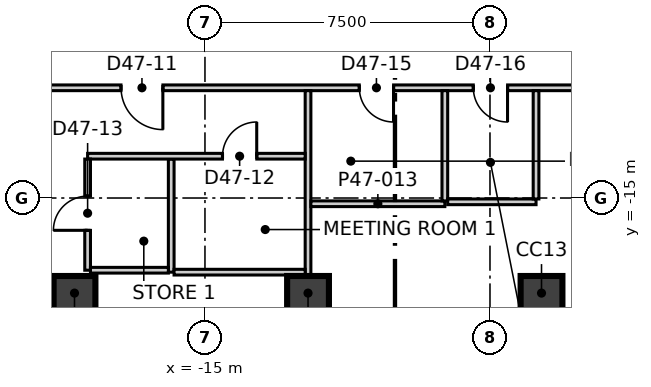
"""IFC4 building model, lengths in metres.
Left out: names, types, materials, properties, quantities, classifications, styles, units other than length and angle.
Written with IfcOpenShell. Run it as: python <this file> out.ifc"""

import sys

from ifc_helpers import new_model, si_unit, direction, frame, frame_2d, origin, origin_2d, place, context, subcontext, project, spatial, rectangle, extrude, element, fill, save


model = new_model("IFC4")
c1 = context("Model", 3, precision=1e-05, world=origin(), true_north=direction((0.0, 1.0)))
c2 = subcontext(c1, "Body", "Model", "MODEL_VIEW")
j1 = project(units=[si_unit("LENGTHUNIT", "METRE"), si_unit("PLANEANGLEUNIT", "RADIAN")], contexts=[c1])
p1 = place(None, origin())
s1 = spatial("IfcSite", under=j1, at=p1, CompositionType="ELEMENT")
p2 = place(p1, origin())
s2 = spatial("IfcBuilding", under=s1, at=p2, CompositionType="ELEMENT")
p3 = place(p2, frame((0.0, 0.0, 203.3)))
s3 = spatial("IfcBuildingStorey", under=s2, at=p3, CompositionType="ELEMENT", Elevation=203.3)
for number, where, z_axis, x_axis in (
    (1, (-18.433, -17.502, -0.3), (0.0, 0.0, 1.0), (1.0, 0.0, 0.0)),
    (2, (-12.288, -17.502, -0.3), (0.0, 0.0, 1.0), (1.0, 0.0, 0.0)),
    (3, (-6.144, -17.502, -0.3), (0.0, 0.0, 1.0), (1.0, 0.0, 0.0)),
):
    element("IfcColumn", number, at=place(p3, frame(where, z_axis=z_axis, x_axis=x_axis)), inside=s3, PredefinedType="COLUMN", context=c2, shape_type="SweptSolid", body=[
        extrude(rectangle(XDim=1.1, YDim=0.9, at=origin_2d()), origin(), (0.0, 0.0, 1.0), 4.0),
    ])
p4 = place(p3, frame((-2.824, 31.513, 0.0), z_axis=(0.0, 0.0, 1.0), x_axis=(-0.500012324412, -0.866018288165, 0.0)))
e4 = element("IfcWall", 4, at=p4, inside=s3, PredefinedType="ELEMENTEDWALL", context=c2, shape_type="SweptSolid", body=[
    extrude(rectangle(XDim=51.739, YDim=0.2, at=frame_2d((25.87, 0.0))), origin(), (0.0, 0.0, 1.0), 3.7),
])
p5 = place(p4, frame((2.275, 0.0, 0.9)))
e5 = element("IfcOpeningElement", 5, at=p5, cuts=e4, PredefinedType="OPENING", context=c2, shape_type="SweptSolid", body=[
    extrude(rectangle(XDim=4.2, YDim=2.5, at=frame_2d((2.1, 1.25))), frame((0.0, 0.11, 0.0), z_axis=(0.0, -1.0, 0.0), x_axis=(1.0, 0.0, 0.0)), (0.0, 0.0, 1.0), 0.22),
])
p6 = place(p4, frame((8.419, 0.0, 0.9)))
e6 = element("IfcOpeningElement", 6, at=p6, cuts=e4, PredefinedType="OPENING", context=c2, shape_type="SweptSolid", body=[
    extrude(rectangle(XDim=4.2, YDim=2.5, at=frame_2d((2.1, 1.25))), frame((0.0, 0.11, 0.0), z_axis=(0.0, -1.0, 0.0), x_axis=(1.0, 0.0, 0.0)), (0.0, 0.0, 1.0), 0.22),
])
p7 = place(p4, frame((14.563, 0.0, 0.9)))
e7 = element("IfcOpeningElement", 7, at=p7, cuts=e4, PredefinedType="OPENING", context=c2, shape_type="SweptSolid", body=[
    extrude(rectangle(XDim=4.2, YDim=2.5, at=frame_2d((2.1, 1.25))), frame((0.0, 0.11, 0.0), z_axis=(0.0, -1.0, 0.0), x_axis=(1.0, 0.0, 0.0)), (0.0, 0.0, 1.0), 0.22),
])
p8 = place(p4, frame((20.707, 0.0, 0.9)))
e8 = element("IfcOpeningElement", 8, at=p8, cuts=e4, PredefinedType="OPENING", context=c2, shape_type="SweptSolid", body=[
    extrude(rectangle(XDim=4.2, YDim=2.5, at=frame_2d((2.1, 1.25))), frame((0.0, 0.11, 0.0), z_axis=(0.0, -1.0, 0.0), x_axis=(1.0, 0.0, 0.0)), (0.0, 0.0, 1.0), 0.22),
])
p9 = place(p4, frame((26.851, 0.0, 0.9)))
e9 = element("IfcOpeningElement", 9, at=p9, cuts=e4, PredefinedType="OPENING", context=c2, shape_type="SweptSolid", body=[
    extrude(rectangle(XDim=4.2, YDim=2.5, at=frame_2d((2.1, 1.25))), frame((0.0, 0.11, 0.0), z_axis=(0.0, -1.0, 0.0), x_axis=(1.0, 0.0, 0.0)), (0.0, 0.0, 1.0), 0.22),
])
p10 = place(p4, frame((32.995, 0.0, 0.9)))
e10 = element("IfcOpeningElement", 10, at=p10, cuts=e4, PredefinedType="OPENING", context=c2, shape_type="SweptSolid", body=[
    extrude(rectangle(XDim=4.2, YDim=2.5, at=frame_2d((2.1, 1.25))), frame((0.0, 0.11, 0.0), z_axis=(0.0, -1.0, 0.0), x_axis=(1.0, 0.0, 0.0)), (0.0, 0.0, 1.0), 0.22),
])
p11 = place(p4, frame((39.14, 0.0, 0.9)))
e11 = element("IfcOpeningElement", 11, at=p11, cuts=e4, PredefinedType="OPENING", context=c2, shape_type="SweptSolid", body=[
    extrude(rectangle(XDim=4.2, YDim=2.5, at=frame_2d((2.1, 1.25))), frame((0.0, 0.11, 0.0), z_axis=(0.0, -1.0, 0.0), x_axis=(1.0, 0.0, 0.0)), (0.0, 0.0, 1.0), 0.22),
])
p12 = place(p4, frame((45.284, 0.0, 0.9)))
e12 = element("IfcOpeningElement", 12, at=p12, cuts=e4, PredefinedType="OPENING", context=c2, shape_type="SweptSolid", body=[
    extrude(rectangle(XDim=4.2, YDim=2.5, at=frame_2d((2.1, 1.25))), frame((0.0, 0.11, 0.0), z_axis=(0.0, -1.0, 0.0), x_axis=(1.0, 0.0, 0.0)), (0.0, 0.0, 1.0), 0.22),
])
p13 = place(p3, frame((-20.883, -11.97, 0.0), z_axis=(0.0, 0.0, 1.0), x_axis=(0.500006150555, 0.866021852731, 0.0)))
e13 = element("IfcWall", 13, at=p13, inside=s3, PredefinedType="PARTITIONING", context=c2, shape_type="SweptSolid", body=[
    extrude(rectangle(XDim=41.766, YDim=0.15, at=frame_2d((20.883, 0.0))), origin(), (0.0, 0.0, 1.0), 3.7),
])
p14 = place(p13, frame((36.916, 0.0, 0.0)))
e14 = element("IfcOpeningElement", 14, at=p14, cuts=e13, PredefinedType="OPENING", context=c2, shape_type="SweptSolid", body=[
    extrude(rectangle(XDim=1.1, YDim=2.1, at=frame_2d((0.55, 1.05))), frame((0.0, 0.085, 0.0), z_axis=(0.0, -1.0, 0.0), x_axis=(1.0, 0.0, 0.0)), (0.0, 0.0, 1.0), 0.17),
])
p15 = place(p13, frame((26.446, 0.0, 0.0)))
e15 = element("IfcOpeningElement", 15, at=p15, cuts=e13, PredefinedType="OPENING", context=c2, shape_type="SweptSolid", body=[
    extrude(rectangle(XDim=1.1, YDim=2.1, at=frame_2d((0.55, 1.05))), frame((0.0, 0.085, 0.0), z_axis=(0.0, -1.0, 0.0), x_axis=(1.0, 0.0, 0.0)), (0.0, 0.0, 1.0), 0.17),
])
p16 = place(p13, frame((9.757, 0.0, 0.0)))
e16 = element("IfcOpeningElement", 16, at=p16, cuts=e13, PredefinedType="OPENING", context=c2, shape_type="SweptSolid", body=[
    extrude(rectangle(XDim=1.1, YDim=2.1, at=frame_2d((0.55, 1.05))), frame((0.0, 0.085, 0.0), z_axis=(0.0, -1.0, 0.0), x_axis=(1.0, 0.0, 0.0)), (0.0, 0.0, 1.0), 0.17),
])
p17 = place(p13, frame((18.757, 0.0, 0.0)))
e17 = element("IfcOpeningElement", 17, at=p17, cuts=e13, PredefinedType="OPENING", context=c2, shape_type="SweptSolid", body=[
    extrude(rectangle(XDim=0.9, YDim=2.1, at=frame_2d((0.45, 1.05))), frame((0.0, 0.085, 0.0), z_axis=(0.0, -1.0, 0.0), x_axis=(1.0, 0.0, 0.0)), (0.0, 0.0, 1.0), 0.17),
])
p18 = place(p13, frame((15.557, 0.0, 0.0)))
e18 = element("IfcOpeningElement", 18, at=p18, cuts=e13, PredefinedType="OPENING", context=c2, shape_type="SweptSolid", body=[
    extrude(rectangle(XDim=0.9, YDim=2.1, at=frame_2d((0.45, 1.05))), frame((0.0, 0.085, 0.0), z_axis=(0.0, -1.0, 0.0), x_axis=(1.0, 0.0, 0.0)), (0.0, 0.0, 1.0), 0.17),
])
p19 = place(p13, frame((12.657, 0.0, 0.0)))
e19 = element("IfcOpeningElement", 19, at=p19, cuts=e13, PredefinedType="OPENING", context=c2, shape_type="SweptSolid", body=[
    extrude(rectangle(XDim=1.0, YDim=2.1, at=frame_2d((0.5, 1.05))), frame((0.0, 0.085, 0.0), z_axis=(0.0, -1.0, 0.0), x_axis=(1.0, 0.0, 0.0)), (0.0, 0.0, 1.0), 0.17),
])
p20 = place(p13, frame((3.669, 0.0, 0.0)))
e20 = element("IfcOpeningElement", 20, at=p20, cuts=e13, PredefinedType="OPENING", context=c2, shape_type="SweptSolid", body=[
    extrude(rectangle(XDim=1.1, YDim=2.1, at=frame_2d((0.55, 1.05))), frame((0.0, 0.085, 0.0), z_axis=(0.0, -1.0, 0.0), x_axis=(1.0, 0.0, 0.0)), (0.0, 0.0, 1.0), 0.17),
])
p21 = place(p3, frame((-20.808, -12.1, 0.0), z_axis=(0.0, 0.0, 1.0), x_axis=(1.0, 0.0, 0.0)))
e21 = element("IfcWall", 21, at=p21, inside=s3, PredefinedType="PARTITIONING", context=c2, shape_type="SweptSolid", body=[
    extrude(rectangle(XDim=41.766, YDim=0.15, at=frame_2d((20.883, 0.0))), origin(), (0.0, 0.0, 1.0), 3.7),
])
p22 = place(p21, frame((3.6, 0.0, 0.0)))
e22 = element("IfcOpeningElement", 22, at=p22, cuts=e21, PredefinedType="OPENING", context=c2, shape_type="SweptSolid", body=[
    extrude(rectangle(XDim=1.1, YDim=2.1, at=frame_2d((0.55, 1.05))), frame((0.0, 0.085, 0.0), z_axis=(0.0, -1.0, 0.0), x_axis=(1.0, 0.0, 0.0)), (0.0, 0.0, 1.0), 0.17),
])
p23 = place(p21, frame((17.07, 0.0, 0.0)))
e23 = element("IfcOpeningElement", 23, at=p23, cuts=e21, PredefinedType="OPENING", context=c2, shape_type="SweptSolid", body=[
    extrude(rectangle(XDim=1.1, YDim=2.1, at=frame_2d((0.55, 1.05))), frame((0.0, 0.085, 0.0), z_axis=(0.0, -1.0, 0.0), x_axis=(1.0, 0.0, 0.0)), (0.0, 0.0, 1.0), 0.17),
])
p24 = place(p21, frame((9.87, 0.0, 0.0)))
e24 = element("IfcOpeningElement", 24, at=p24, cuts=e21, PredefinedType="OPENING", context=c2, shape_type="SweptSolid", body=[
    extrude(rectangle(XDim=0.9, YDim=2.1, at=frame_2d((0.45, 1.05))), frame((0.0, 0.085, 0.0), z_axis=(0.0, -1.0, 0.0), x_axis=(1.0, 0.0, 0.0)), (0.0, 0.0, 1.0), 0.17),
])
p25 = place(p21, frame((12.87, 0.0, 0.0)))
e25 = element("IfcOpeningElement", 25, at=p25, cuts=e21, PredefinedType="OPENING", context=c2, shape_type="SweptSolid", body=[
    extrude(rectangle(XDim=0.9, YDim=2.1, at=frame_2d((0.45, 1.05))), frame((0.0, 0.085, 0.0), z_axis=(0.0, -1.0, 0.0), x_axis=(1.0, 0.0, 0.0)), (0.0, 0.0, 1.0), 0.17),
])
p26 = place(p21, frame((27.658, 0.0, 0.0)))
e26 = element("IfcOpeningElement", 26, at=p26, cuts=e21, PredefinedType="OPENING", context=c2, shape_type="SweptSolid", body=[
    extrude(rectangle(XDim=1.0, YDim=2.1, at=frame_2d((0.5, 1.05))), frame((0.0, 0.085, 0.0), z_axis=(0.0, -1.0, 0.0), x_axis=(1.0, 0.0, 0.0)), (0.0, 0.0, 1.0), 0.17),
])
p27 = place(p21, frame((21.558, 0.0, 0.0)))
e27 = element("IfcOpeningElement", 27, at=p27, cuts=e21, PredefinedType="OPENING", context=c2, shape_type="SweptSolid", body=[
    extrude(rectangle(XDim=0.9, YDim=2.1, at=frame_2d((0.45, 1.05))), frame((0.0, 0.085, 0.0), z_axis=(0.0, -1.0, 0.0), x_axis=(1.0, 0.0, 0.0)), (0.0, 0.0, 1.0), 0.17),
])
p28 = place(p21, frame((36.847, 0.0, 0.0)))
e28 = element("IfcOpeningElement", 28, at=p28, cuts=e21, PredefinedType="OPENING", context=c2, shape_type="SweptSolid", body=[
    extrude(rectangle(XDim=1.1, YDim=2.1, at=frame_2d((0.55, 1.05))), frame((0.0, 0.085, 0.0), z_axis=(0.0, -1.0, 0.0), x_axis=(1.0, 0.0, 0.0)), (0.0, 0.0, 1.0), 0.17),
])
p29 = place(p3, frame((-12.288, -18.122, 0.0), z_axis=(0.0, 0.0, 1.0), x_axis=(0.0, 1.0, 0.0)))
e29 = element("IfcWall", 29, at=p29, inside=s3, PredefinedType="PARTITIONING", context=c2, shape_type="SweptSolid", body=[
    extrude(rectangle(XDim=5.947, YDim=0.15, at=frame_2d((2.974, 0.0))), origin(), (0.0, 0.0, 1.0), 3.7),
])
p30 = place(p3, frame((-12.213, -15.151, 0.0), z_axis=(0.0, 0.0, 1.0), x_axis=(1.0, 0.0, 0.0)))
e30 = element("IfcWall", 30, at=p30, inside=s3, PredefinedType="PARTITIONING", context=c2, shape_type="SweptSolid", body=[
    extrude(rectangle(XDim=3.525, YDim=0.15, at=frame_2d((1.762, 0.0))), origin(), (0.0, 0.0, 1.0), 3.7),
])
p31 = place(p3, frame((-8.688, -15.076, 0.0), z_axis=(0.0, 0.0, 1.0), x_axis=(0.0, 1.0, 0.0)))
e31 = element("IfcWall", 31, at=p31, inside=s3, PredefinedType="PARTITIONING", context=c2, shape_type="SweptSolid", body=[
    extrude(rectangle(XDim=2.901, YDim=0.15, at=frame_2d((1.45, 0.0))), origin(), (0.0, 0.0, 1.0), 3.7),
])
p32 = place(p3, frame((-8.613, -15.1, 0.0), z_axis=(0.0, 0.0, 1.0), x_axis=(1.0, 0.0, 0.0)))
e32 = element("IfcWall", 32, at=p32, inside=s3, PredefinedType="PARTITIONING", context=c2, shape_type="SweptSolid", body=[
    extrude(rectangle(XDim=2.325, YDim=0.15, at=frame_2d((1.163, 0.0))), origin(), (0.0, 0.0, 1.0), 3.7),
])
p33 = place(p3, frame((-6.288, -15.025, 0.0), z_axis=(0.0, 0.0, 1.0), x_axis=(0.0, 1.0, 0.0)))
e33 = element("IfcWall", 33, at=p33, inside=s3, PredefinedType="PARTITIONING", context=c2, shape_type="SweptSolid", body=[
    extrude(rectangle(XDim=2.85, YDim=0.15, at=frame_2d((1.425, 0.0))), origin(), (0.0, 0.0, 1.0), 3.7),
])
p34 = place(p3, frame((-15.888, -16.951, 0.0), z_axis=(0.0, 0.0, 1.0), x_axis=(0.0, 1.0, 0.0)))
e34 = element("IfcWall", 34, at=p34, inside=s3, PredefinedType="PARTITIONING", context=c2, shape_type="SweptSolid", body=[
    extrude(rectangle(XDim=2.976, YDim=0.15, at=frame_2d((1.488, 0.0))), origin(), (0.0, 0.0, 1.0), 3.7),
])
p35 = place(p3, frame((-18.088, -13.9, 0.0), z_axis=(0.0, 0.0, 1.0), x_axis=(1.0, 0.0, 0.0)))
e35 = element("IfcWall", 35, at=p35, inside=s3, PredefinedType="PARTITIONING", context=c2, shape_type="SweptSolid", body=[
    extrude(rectangle(XDim=5.725, YDim=0.15, at=frame_2d((2.862, 0.0))), origin(), (0.0, 0.0, 1.0), 3.7),
])
p36 = place(p35, frame((3.55, 0.0, 0.0)))
e36 = element("IfcOpeningElement", 36, at=p36, cuts=e35, PredefinedType="OPENING", context=c2, shape_type="SweptSolid", body=[
    extrude(rectangle(XDim=0.9, YDim=2.1, at=frame_2d((0.45, 1.05))), frame((0.0, 0.085, 0.0), z_axis=(0.0, -1.0, 0.0), x_axis=(1.0, 0.0, 0.0)), (0.0, 0.0, 1.0), 0.17),
])
p37 = place(p3, frame((-18.088, -16.9, 0.0), z_axis=(0.0, 0.0, 1.0), x_axis=(0.0, 1.0, 0.0)))
e37 = element("IfcWall", 37, at=p37, inside=s3, PredefinedType="PARTITIONING", context=c2, shape_type="SweptSolid", body=[
    extrude(rectangle(XDim=2.925, YDim=0.15, at=frame_2d((1.462, 0.0))), origin(), (0.0, 0.0, 1.0), 3.7),
])
p38 = place(p37, frame((1.05, 0.0, 0.0)))
e38 = element("IfcOpeningElement", 38, at=p38, cuts=e37, PredefinedType="OPENING", context=c2, shape_type="SweptSolid", body=[
    extrude(rectangle(XDim=0.9, YDim=2.1, at=frame_2d((0.45, 1.05))), frame((0.0, 0.085, 0.0), z_axis=(0.0, -1.0, 0.0), x_axis=(1.0, 0.0, 0.0)), (0.0, 0.0, 1.0), 0.17),
])
p39 = place(p3, frame((-18.013, -16.9, 0.0), z_axis=(0.0, 0.0, 1.0), x_axis=(1.0, 0.0, 0.0)))
e39 = element("IfcWall", 39, at=p39, inside=s3, PredefinedType="PARTITIONING", context=c2, shape_type="SweptSolid", body=[
    extrude(rectangle(XDim=2.05, YDim=0.15, at=frame_2d((1.025, 0.0))), origin(), (0.0, 0.0, 1.0), 3.7),
])
p40 = place(p3, frame((-15.813, -16.951, 0.0), z_axis=(0.0, 0.0, 1.0), x_axis=(1.0, 0.0, 0.0)))
e40 = element("IfcWall", 40, at=p40, inside=s3, PredefinedType="PARTITIONING", context=c2, shape_type="SweptSolid", body=[
    extrude(rectangle(XDim=3.45, YDim=0.15, at=frame_2d((1.725, 0.0))), origin(), (0.0, 0.0, 1.0), 3.7),
])
p41 = place(p22, origin())
e41 = element("IfcDoor", 41, at=p41, inside=s3, OperationType="SINGLE_SWING_RIGHT", PredefinedType="DOOR", context=c2, shape_type="SweptSolid", body=[
    extrude(rectangle(XDim=1.1, YDim=2.1, at=frame_2d((0.55, 1.05))), frame((0.0, 0.025, 0.0), z_axis=(0.0, -1.0, 0.0), x_axis=(1.0, 0.0, 0.0)), (0.0, 0.0, 1.0), 0.05),
])
fill(e22, e41)
p42 = place(p36, origin())
e42 = element("IfcDoor", 42, at=p42, inside=s3, OperationType="SINGLE_SWING_LEFT", PredefinedType="DOOR", context=c2, shape_type="SweptSolid", body=[
    extrude(rectangle(XDim=0.9, YDim=2.1, at=frame_2d((0.45, 1.05))), frame((0.0, 0.025, 0.0), z_axis=(0.0, -1.0, 0.0), x_axis=(1.0, 0.0, 0.0)), (0.0, 0.0, 1.0), 0.05),
])
fill(e36, e42)
p43 = place(p38, origin())
e43 = element("IfcDoor", 43, at=p43, inside=s3, OperationType="SINGLE_SWING_RIGHT", PredefinedType="DOOR", context=c2, shape_type="SweptSolid", body=[
    extrude(rectangle(XDim=0.9, YDim=2.1, at=frame_2d((0.45, 1.05))), frame((0.0, 0.025, 0.0), z_axis=(0.0, -1.0, 0.0), x_axis=(1.0, 0.0, 0.0)), (0.0, 0.0, 1.0), 0.05),
])
fill(e38, e43)
p44 = place(p24, origin())
e44 = element("IfcDoor", 44, at=p44, inside=s3, OperationType="SINGLE_SWING_RIGHT", PredefinedType="DOOR", context=c2, shape_type="SweptSolid", body=[
    extrude(rectangle(XDim=0.9, YDim=2.1, at=frame_2d((0.45, 1.05))), frame((0.0, 0.025, 0.0), z_axis=(0.0, -1.0, 0.0), x_axis=(1.0, 0.0, 0.0)), (0.0, 0.0, 1.0), 0.05),
])
fill(e24, e44)
p45 = place(p25, origin())
e45 = element("IfcDoor", 45, at=p45, inside=s3, OperationType="SINGLE_SWING_RIGHT", PredefinedType="DOOR", context=c2, shape_type="SweptSolid", body=[
    extrude(rectangle(XDim=0.9, YDim=2.1, at=frame_2d((0.45, 1.05))), frame((0.0, 0.025, 0.0), z_axis=(0.0, -1.0, 0.0), x_axis=(1.0, 0.0, 0.0)), (0.0, 0.0, 1.0), 0.05),
])
fill(e25, e45)
save(model, sys.argv[1])
